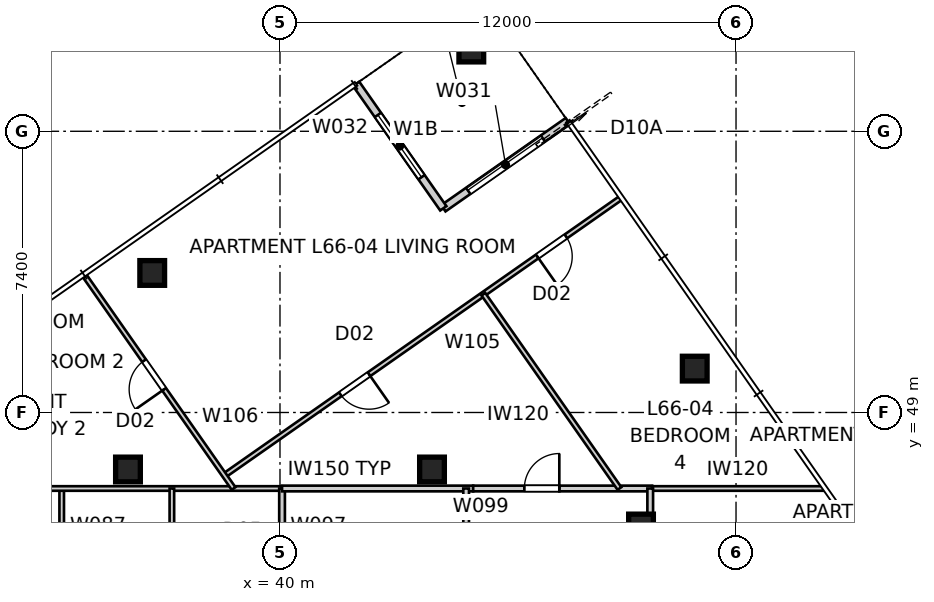
"""IFC4 building model, lengths in metres.
Left out: names, types, materials, properties, quantities, classifications, styles, units other than length and angle.
Written with IfcOpenShell. Run it as: python <this file> out.ifc"""

import sys

from ifc_helpers import new_model, si_unit, direction, frame, frame_2d, origin, origin_2d, place, context, subcontext, project, spatial, rectangle, extrude, element, fill, save


model = new_model("IFC4")
c1 = context("Model", 3, precision=1e-05, world=origin(), true_north=direction((0.0, 1.0)))
c2 = subcontext(c1, "Body", "Model", "MODEL_VIEW")
j1 = project(units=[si_unit("LENGTHUNIT", "METRE"), si_unit("PLANEANGLEUNIT", "RADIAN")], contexts=[c1])
p1 = place(None, origin())
s1 = spatial("IfcSite", under=j1, at=p1, CompositionType="ELEMENT")
p2 = place(p1, origin())
s2 = spatial("IfcBuilding", under=s1, at=p2, CompositionType="ELEMENT")
p3 = place(p2, frame((0.0, 0.0, 240.4)))
s3 = spatial("IfcBuildingStorey", under=s2, at=p3, CompositionType="ELEMENT", Elevation=240.4)
for number, where, z_axis, x_axis in (
    (1, (50.914, 50.155, -0.15), (0.0, 0.0, 1.0), (1.0, 0.0, 0.0)),
    (2, (45.034, 58.551, -0.15), (0.0, 0.0, 1.0), (1.0, 0.0, 0.0)),
    (3, (36.638, 52.672, -0.15), (0.0, 0.0, 1.0), (1.0, 0.0, 0.0)),
):
    element("IfcColumn", number, at=place(p3, frame(where, z_axis=z_axis, x_axis=x_axis)), inside=s3, PredefinedType="COLUMN", context=c2, shape_type="SweptSolid", body=[
        extrude(rectangle(XDim=0.65, YDim=0.65, at=origin_2d()), origin(), (0.0, 0.0, 1.0), 3.55),
    ])
for number, where, z_axis, x_axis in (
    (4, (49.5, 46.0, 0.0), (0.0, 0.0, 1.0), (1.0, 0.0, 0.0)),
    (5, (44.0, 47.5, 0.0), (0.0, 0.0, 1.0), (1.0, 0.0, 0.0)),
    (6, (36.0, 47.5, 0.0), (0.0, 0.0, 1.0), (1.0, 0.0, 0.0)),
):
    element("IfcColumn", number, at=place(p3, frame(where, z_axis=z_axis, x_axis=x_axis)), inside=s3, PredefinedType="COLUMN", context=c2, shape_type="SweptSolid", body=[
        extrude(rectangle(XDim=0.65, YDim=0.65, at=origin_2d()), origin(), (0.0, 0.0, 1.0), 3.4),
    ])
p4 = place(p3, frame((47.574, 56.667, 0.0), z_axis=(0.0, 0.0, 1.0), x_axis=(-0.819165963305, -0.573556557423, 0.0)))
e7 = element("IfcWall", 7, at=p4, inside=s3, PredefinedType="SOLIDWALL", context=c2, shape_type="SweptSolid", body=[
    extrude(rectangle(XDim=4.0, YDim=0.2, at=frame_2d((2.0, 0.0))), origin(), (0.0, 0.0, 1.0), 3.25),
])
p5 = place(p4, frame((0.8, 0.0, 0.0)))
e8 = element("IfcOpeningElement", 8, at=p5, cuts=e7, PredefinedType="OPENING", context=c2, shape_type="SweptSolid", body=[
    extrude(rectangle(XDim=2.4, YDim=2.1, at=frame_2d((1.2, 1.05))), frame((0.0, 0.11, 0.0), z_axis=(0.0, -1.0, 0.0), x_axis=(1.0, 0.0, 0.0)), (0.0, 0.0, 1.0), 0.22),
])
p6 = place(p3, frame((44.298, 54.373, 0.0), z_axis=(0.0, 0.0, 1.0), x_axis=(-0.573597512525, 0.819137286189, 0.0)))
e9 = element("IfcWall", 9, at=p6, inside=s3, PredefinedType="SOLIDWALL", context=c2, shape_type="SweptSolid", body=[
    extrude(rectangle(XDim=4.0, YDim=0.2, at=frame_2d((2.0, 0.0))), origin(), (0.0, 0.0, 1.0), 3.25),
])
p7 = place(p6, frame((1.0, 0.0, 0.45)))
e10 = element("IfcOpeningElement", 10, at=p7, cuts=e9, PredefinedType="OPENING", context=c2, shape_type="SweptSolid", body=[
    extrude(rectangle(XDim=2.0, YDim=1.8, at=frame_2d((1.0, 0.9))), frame((0.0, 0.11, 0.0), z_axis=(0.0, -1.0, 0.0), x_axis=(1.0, 0.0, 0.0)), (0.0, 0.0, 1.0), 0.22),
])
p8 = place(p3, frame((34.256, 47.0, 0.0), z_axis=(0.0, 0.0, 1.0), x_axis=(0.0, -1.0, 0.0)))
e11 = element("IfcWall", 11, at=p8, inside=s3, PredefinedType="PARTITIONING", context=c2, shape_type="SweptSolid", body=[
    extrude(rectangle(XDim=4.9, YDim=0.12, at=frame_2d((2.45, 0.0))), origin(), (0.0, 0.0, 1.0), 2.796),
])
p9 = place(p8, frame((1.97, 0.0, 0.0)))
e12 = element("IfcOpeningElement", 12, at=p9, cuts=e11, PredefinedType="OPENING", context=c2, shape_type="SweptSolid", body=[
    extrude(rectangle(XDim=0.96, YDim=2.1, at=frame_2d((0.48, 1.05))), frame((0.0, 0.07, 0.0), z_axis=(0.0, -1.0, 0.0), x_axis=(1.0, 0.0, 0.0)), (0.0, 0.0, 1.0), 0.14),
])
p10 = place(p3, frame((28.708, 47.0, 0.0), z_axis=(0.0, 0.0, 1.0), x_axis=(1.0, 0.0, 0.0)))
e13 = element("IfcWall", 13, at=p10, inside=s3, PredefinedType="PARTITIONING", context=c2, shape_type="SweptSolid", body=[
    extrude(rectangle(XDim=11.346, YDim=0.12, at=frame_2d((5.673, 0.0))), origin(), (0.0, 0.0, 1.0), 2.55),
])
p11 = place(p10, frame((0.477, 0.0, 0.0)))
e14 = element("IfcOpeningElement", 14, at=p11, cuts=e13, PredefinedType="OPENING", context=c2, shape_type="SweptSolid", body=[
    extrude(rectangle(XDim=0.92, YDim=2.34, at=frame_2d((0.46, 1.17))), frame((0.0, 0.07, 0.0), z_axis=(0.0, -1.0, 0.0), x_axis=(1.0, 0.0, 0.0)), (0.0, 0.0, 1.0), 0.14),
])
p12 = place(p3, frame((37.155, 42.1, 0.0), z_axis=(0.0, 0.0, 1.0), x_axis=(0.0, 1.0, 0.0)))
e15 = element("IfcWall", 15, at=p12, inside=s3, PredefinedType="PARTITIONING", context=c2, shape_type="SweptSolid", body=[
    extrude(rectangle(XDim=4.9, YDim=0.12, at=frame_2d((2.45, 0.0))), origin(), (0.0, 0.0, 1.0), 2.796),
])
p13 = place(p12, frame((1.97, 0.0, 0.0)))
e16 = element("IfcOpeningElement", 16, at=p13, cuts=e15, PredefinedType="OPENING", context=c2, shape_type="SweptSolid", body=[
    extrude(rectangle(XDim=0.96, YDim=2.1, at=frame_2d((0.48, 1.05))), frame((0.0, 0.07, 0.0), z_axis=(0.0, -1.0, 0.0), x_axis=(1.0, 0.0, 0.0)), (0.0, 0.0, 1.0), 0.14),
])
p14 = place(p3, frame((40.054, 47.0, 0.0), z_axis=(0.0, 0.0, 1.0), x_axis=(0.0, -1.0, 0.0)))
e17 = element("IfcWall", 17, at=p14, inside=s3, PredefinedType="SOLIDWALL", context=c2, shape_type="SweptSolid", body=[
    extrude(rectangle(XDim=4.9, YDim=0.15, at=frame_2d((2.45, 0.0))), origin(), (0.0, 0.0, 1.0), 2.796),
])
p15 = place(p14, frame((1.97, 0.0, 0.0)))
e18 = element("IfcOpeningElement", 18, at=p15, cuts=e17, PredefinedType="OPENING", context=c2, shape_type="SweptSolid", body=[
    extrude(rectangle(XDim=0.96, YDim=2.1, at=frame_2d((0.48, 1.05))), frame((0.0, 0.085, 0.0), z_axis=(0.0, -1.0, 0.0), x_axis=(1.0, 0.0, 0.0)), (0.0, 0.0, 1.0), 0.17),
])
p16 = place(p3, frame((40.054, 47.0, 0.0), z_axis=(0.0, 0.0, 1.0), x_axis=(1.0, 0.0, 0.0)))
e19 = element("IfcWall", 19, at=p16, inside=s3, PredefinedType="SOLIDWALL", context=c2, shape_type="SweptSolid", body=[
    extrude(rectangle(XDim=5.029, YDim=0.15, at=frame_2d((2.515, 0.0))), origin(), (0.0, 0.0, 1.0), 3.25),
])
p17 = place(p3, frame((45.083, 47.0, 0.0), z_axis=(0.0, 0.0, 1.0), x_axis=(1.0, 0.0, 0.0)))
e20 = element("IfcWall", 20, at=p17, inside=s3, PredefinedType="SOLIDWALL", context=c2, shape_type="SweptSolid", body=[
    extrude(rectangle(XDim=2.267, YDim=0.15, at=frame_2d((1.133, 0.0))), origin(), (0.0, 0.0, 1.0), 2.55),
])
p18 = place(p17, frame((1.347, 0.0, 0.0)))
e21 = element("IfcOpeningElement", 21, at=p18, cuts=e20, PredefinedType="OPENING", context=c2, shape_type="SweptSolid", body=[
    extrude(rectangle(XDim=0.92, YDim=2.34, at=frame_2d((0.46, 1.17))), frame((0.0, 0.085, 0.0), z_axis=(0.0, -1.0, 0.0), x_axis=(1.0, 0.0, 0.0)), (0.0, 0.0, 1.0), 0.17),
])
p19 = place(p3, frame((47.35, 47.0, 0.0), z_axis=(0.0, 0.0, 1.0), x_axis=(1.0, 0.0, 0.0)))
e22 = element("IfcWall", 22, at=p19, inside=s3, PredefinedType="SOLIDWALL", context=c2, shape_type="SweptSolid", body=[
    extrude(rectangle(XDim=2.442, YDim=0.15, at=frame_2d((1.221, 0.0))), origin(), (0.0, 0.0, 1.0), 3.25),
])
p20 = place(p3, frame((44.898, 47.0, 0.0), z_axis=(0.0, 0.0, 1.0), x_axis=(0.0, -1.0, 0.0)))
e23 = element("IfcWall", 23, at=p20, inside=s3, PredefinedType="SOLIDWALL", context=c2, shape_type="SweptSolid", body=[
    extrude(rectangle(XDim=4.9, YDim=0.15, at=frame_2d((2.45, 0.0))), origin(), (0.0, 0.0, 1.0), 3.25),
])
p21 = place(p3, frame((49.792, 47.0, 0.0), z_axis=(0.0, 0.0, 1.0), x_axis=(1.0, 0.0, 0.0)))
e24 = element("IfcWall", 24, at=p21, inside=s3, PredefinedType="PARTITIONING", context=c2, shape_type="SweptSolid", body=[
    extrude(rectangle(XDim=4.502, YDim=0.12, at=frame_2d((2.251, 0.0))), origin(), (0.0, 0.0, 1.0), 3.25),
])
p22 = place(p3, frame((49.742, 42.1, 0.0), z_axis=(0.0, 0.0, 1.0), x_axis=(0.0, 1.0, 0.0)))
e25 = element("IfcWall", 25, at=p22, inside=s3, PredefinedType="SOLIDWALL", context=c2, shape_type="SweptSolid", body=[
    extrude(rectangle(XDim=4.9, YDim=0.15, at=frame_2d((2.45, 0.0))), origin(), (0.0, 0.0, 1.0), 3.25),
])
p23 = place(p22, frame((1.99, 0.0, 0.0)))
e26 = element("IfcOpeningElement", 26, at=p23, cuts=e25, PredefinedType="OPENING", context=c2, shape_type="SweptSolid", body=[
    extrude(rectangle(XDim=0.92, YDim=2.34, at=frame_2d((0.46, 1.17))), frame((0.0, 0.085, 0.0), z_axis=(0.0, -1.0, 0.0), x_axis=(1.0, 0.0, 0.0)), (0.0, 0.0, 1.0), 0.17),
])
p24 = place(p3, frame((48.949, 54.633, 0.0), z_axis=(0.0, 0.0, 1.0), x_axis=(-0.819155207289, -0.573571919092, 0.0)))
e27 = element("IfcWall", 27, at=p24, inside=s3, PredefinedType="PARTITIONING", context=c2, shape_type="SweptSolid", body=[
    extrude(rectangle(XDim=12.71, YDim=0.12, at=frame_2d((6.355, 0.0))), origin(), (0.0, 0.0, 1.0), 3.25),
])
p25 = place(p24, frame((8.066, 0.0, 0.0)))
e28 = element("IfcOpeningElement", 28, at=p25, cuts=e27, PredefinedType="OPENING", context=c2, shape_type="SweptSolid", body=[
    extrude(rectangle(XDim=0.92, YDim=2.34, at=frame_2d((0.46, 1.17))), frame((0.0, 0.07, 0.0), z_axis=(0.0, -1.0, 0.0), x_axis=(1.0, 0.0, 0.0)), (0.0, 0.0, 1.0), 0.14),
])
p26 = place(p24, frame((1.741, 0.0, 0.0)))
e29 = element("IfcOpeningElement", 29, at=p26, cuts=e27, PredefinedType="OPENING", context=c2, shape_type="SweptSolid", body=[
    extrude(rectangle(XDim=0.92, YDim=2.34, at=frame_2d((0.46, 1.17))), frame((0.0, 0.07, 0.0), z_axis=(0.0, -1.0, 0.0), x_axis=(1.0, 0.0, 0.0)), (0.0, 0.0, 1.0), 0.14),
])
p27 = place(p3, frame((38.778, 47.0, 0.0), z_axis=(0.0, 0.0, 1.0), x_axis=(-0.57357503053, 0.819153028653, 0.0)))
e30 = element("IfcWall", 30, at=p27, inside=s3, PredefinedType="PARTITIONING", context=c2, shape_type="SweptSolid", body=[
    extrude(rectangle(XDim=6.834, YDim=0.12, at=frame_2d((3.417, 0.0))), origin(), (0.0, 0.0, 1.0), 3.25),
])
p28 = place(p27, frame((3.186, 0.0, 0.0)))
e31 = element("IfcOpeningElement", 31, at=p28, cuts=e30, PredefinedType="OPENING", context=c2, shape_type="SweptSolid", body=[
    extrude(rectangle(XDim=0.92, YDim=2.34, at=frame_2d((0.46, 1.17))), frame((0.0, 0.07, 0.0), z_axis=(0.0, -1.0, 0.0), x_axis=(1.0, 0.0, 0.0)), (0.0, 0.0, 1.0), 0.14),
])
p29 = place(p3, frame((48.932, 47.0, 0.0), z_axis=(0.0, 0.0, 1.0), x_axis=(-0.573569946952, 0.819156588177, 0.0)))
e32 = element("IfcWall", 32, at=p29, inside=s3, PredefinedType="PARTITIONING", context=c2, shape_type="SweptSolid", body=[
    extrude(rectangle(XDim=6.243, YDim=0.12, at=frame_2d((3.122, 0.0))), origin(), (0.0, 0.0, 1.0), 3.25),
])
p30 = place(p5, origin())
e33 = element("IfcDoor", 33, at=p30, inside=s3, OperationType="SLIDING_TO_LEFT", PredefinedType="DOOR", context=c2, shape_type="SweptSolid", body=[
    extrude(rectangle(XDim=2.4, YDim=2.1, at=frame_2d((1.2, 1.05))), frame((0.0, 0.025, 0.0), z_axis=(0.0, -1.0, 0.0), x_axis=(1.0, 0.0, 0.0)), (0.0, 0.0, 1.0), 0.05),
])
fill(e8, e33)
p31 = place(p7, origin())
e34 = element("IfcWindow", 34, at=p31, inside=s3, PartitioningType="SINGLE_PANEL", PredefinedType="WINDOW", context=c2, shape_type="SweptSolid", body=[
    extrude(rectangle(XDim=2.0, YDim=1.8, at=frame_2d((1.0, 0.9))), frame((0.0, 0.03, 0.0), z_axis=(0.0, -1.0, 0.0), x_axis=(1.0, 0.0, 0.0)), (0.0, 0.0, 1.0), 0.06),
])
fill(e10, e34)
p32 = place(p28, origin())
e35 = element("IfcDoor", 35, at=p32, inside=s3, OperationType="SINGLE_SWING_LEFT", PredefinedType="DOOR", context=c2, shape_type="SweptSolid", body=[
    extrude(rectangle(XDim=0.92, YDim=2.34, at=frame_2d((0.46, 1.17))), frame((0.0, 0.025, 0.0), z_axis=(0.0, -1.0, 0.0), x_axis=(1.0, 0.0, 0.0)), (0.0, 0.0, 1.0), 0.05),
])
fill(e31, e35)
p33 = place(p25, origin())
e36 = element("IfcDoor", 36, at=p33, inside=s3, OperationType="SINGLE_SWING_LEFT", PredefinedType="DOOR", context=c2, shape_type="SweptSolid", body=[
    extrude(rectangle(XDim=0.92, YDim=2.34, at=frame_2d((0.46, 1.17))), frame((0.0, 0.025, 0.0), z_axis=(0.0, -1.0, 0.0), x_axis=(1.0, 0.0, 0.0)), (0.0, 0.0, 1.0), 0.05),
])
fill(e28, e36)
p34 = place(p26, origin())
e37 = element("IfcDoor", 37, at=p34, inside=s3, OperationType="SINGLE_SWING_RIGHT", PredefinedType="DOOR", context=c2, shape_type="SweptSolid", body=[
    extrude(rectangle(XDim=0.92, YDim=2.34, at=frame_2d((0.46, 1.17))), frame((0.0, 0.025, 0.0), z_axis=(0.0, -1.0, 0.0), x_axis=(1.0, 0.0, 0.0)), (0.0, 0.0, 1.0), 0.05),
])
fill(e29, e37)
p35 = place(p18, origin())
e38 = element("IfcDoor", 38, at=p35, inside=s3, OperationType="SINGLE_SWING_RIGHT", PredefinedType="DOOR", context=c2, shape_type="SweptSolid", body=[
    extrude(rectangle(XDim=0.92, YDim=2.34, at=frame_2d((0.46, 1.17))), frame((0.0, 0.025, 0.0), z_axis=(0.0, -1.0, 0.0), x_axis=(1.0, 0.0, 0.0)), (0.0, 0.0, 1.0), 0.05),
])
fill(e21, e38)
save(model, sys.argv[1])
